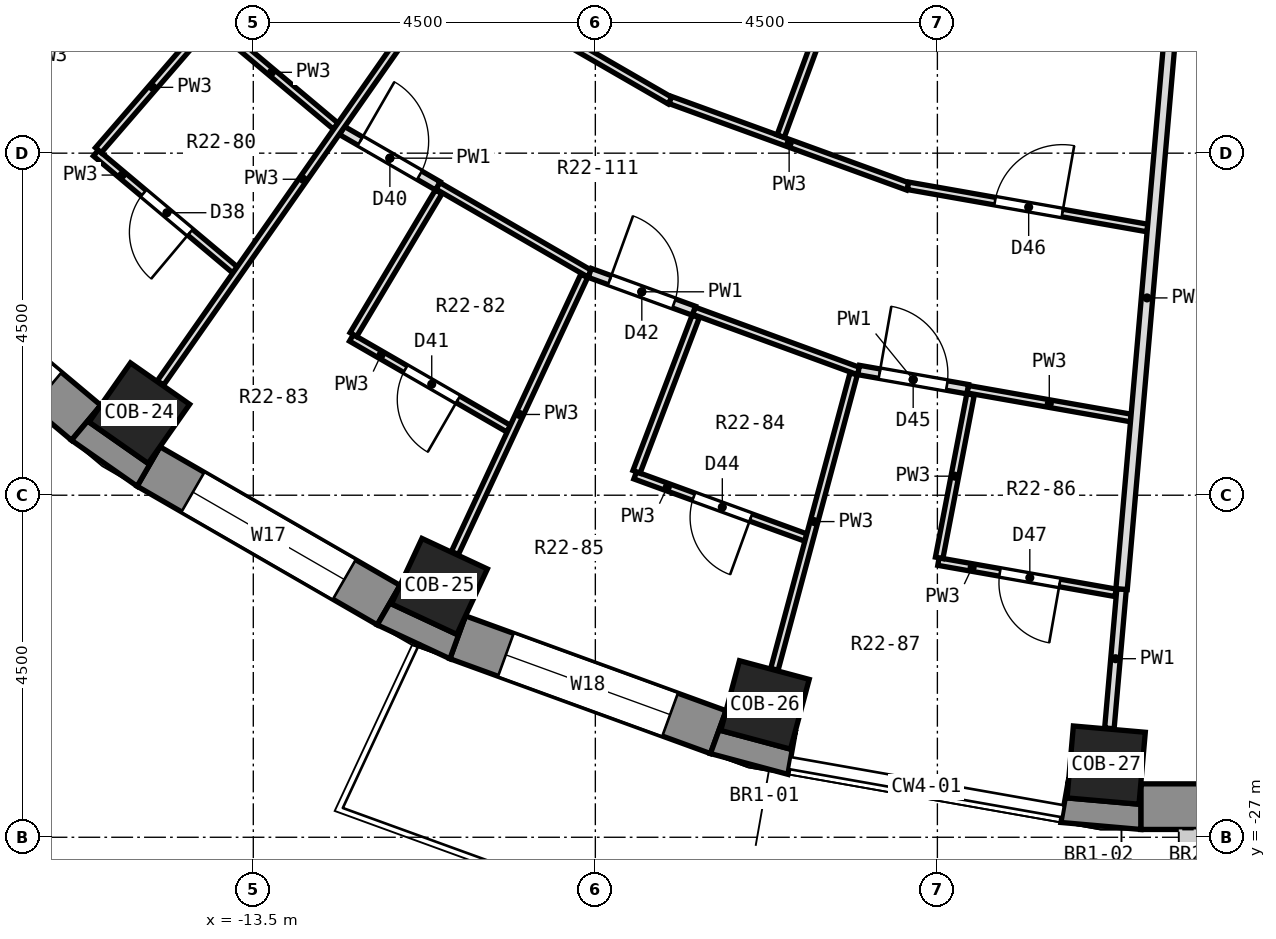
"""IFC4 building model, lengths in metres.
Left out: names, types, materials, properties, quantities, classifications, styles, units other than length and angle.
Written with IfcOpenShell. Run it as: python <this file> out.ifc"""

import sys

from ifc_helpers import new_model, si_unit, direction, frame, frame_2d, origin, origin_2d, place, context, subcontext, project, spatial, polyline, rectangle, outline, extrude, element, fill, save


model = new_model("IFC4")
c1 = context("Model", 3, precision=1e-05, world=origin(), true_north=direction((0.0, 1.0)))
c2 = subcontext(c1, "Body", "Model", "MODEL_VIEW")
j1 = project(units=[si_unit("LENGTHUNIT", "METRE"), si_unit("PLANEANGLEUNIT", "RADIAN")], contexts=[c1])
p1 = place(None, origin())
s1 = spatial("IfcSite", under=j1, at=p1, CompositionType="ELEMENT")
p2 = place(p1, origin())
s2 = spatial("IfcBuilding", under=s1, at=p2, CompositionType="ELEMENT")
p3 = place(p2, frame((0.0, 0.0, 141.4)))
s3 = spatial("IfcBuildingStorey", under=s2, at=p3, CompositionType="ELEMENT", Elevation=141.4)
for number, where, z_axis, x_axis in (
    (1, (-14.999, -21.421, 0.0), (0.0, 0.0, 1.0), (-0.574, -0.819, 0.0)),
    (2, (-11.052, -23.7, 0.0), (0.0, 0.0, 1.0), (-0.423, -0.906, 0.0)),
    (3, (-6.768, -25.259, 0.0), (0.0, 0.0, 1.0), (-0.259, -0.966, 0.0)),
    (4, (-2.279, -26.051, 0.0), (0.0, 0.0, 1.0), (-0.087, -0.996, 0.0)),
):
    element("IfcColumn", number, at=place(p3, frame(where, z_axis=z_axis, x_axis=x_axis)), inside=s3, PredefinedType="COLUMN", context=c2, shape_type="SweptSolid", body=[
        extrude(rectangle(XDim=0.95, YDim=0.95, at=origin_2d()), origin(), (0.0, 0.0, 1.0), 3.3),
    ])
p4 = place(p3, frame((-18.494, -19.202, 0.0), z_axis=(0.0, 0.0, 1.0), x_axis=(0.766055462616, -0.642774476932, 0.0)))
e5 = element("IfcWall", 5, at=p4, inside=s3, PredefinedType="SOLIDWALL", context=c2, shape_type="SweptSolid", body=[
    extrude(rectangle(XDim=3.648, YDim=0.6, at=frame_2d((1.824, 0.0))), origin(), (0.0, 0.0, 1.0), 2.8),
])
p5 = place(p4, frame((0.674, 0.0, 0.9)))
e6 = element("IfcOpeningElement", 6, at=p5, cuts=e5, PredefinedType="OPENING", context=c2, shape_type="SweptSolid", body=[
    extrude(rectangle(XDim=2.3, YDim=1.8, at=frame_2d((1.15, 0.9))), frame((0.0, 0.312, 0.0), z_axis=(0.0, -1.0, 0.0), x_axis=(1.0, 0.0, 0.0)), (0.0, 0.0, 1.0), 0.624),
])
p6 = place(p3, frame((-14.878, -22.122, 0.0), z_axis=(0.0, 0.0, 1.0), x_axis=(0.866051847062, -0.499954196102, 0.0)))
e7 = element("IfcWall", 7, at=p6, inside=s3, PredefinedType="SOLIDWALL", context=c2, shape_type="SweptSolid", body=[
    extrude(rectangle(XDim=3.648, YDim=0.6, at=frame_2d((1.824, 0.0))), origin(), (0.0, 0.0, 1.0), 2.8),
])
p7 = place(p6, frame((0.674, 0.0, 0.9)))
e8 = element("IfcOpeningElement", 8, at=p7, cuts=e7, PredefinedType="OPENING", context=c2, shape_type="SweptSolid", body=[
    extrude(rectangle(XDim=2.3, YDim=1.8, at=frame_2d((1.15, 0.9))), frame((0.0, 0.312, 0.0), z_axis=(0.0, -1.0, 0.0), x_axis=(1.0, 0.0, 0.0)), (0.0, 0.0, 1.0), 0.624),
])
p8 = place(p3, frame((-10.811, -24.369, 0.0), z_axis=(0.0, 0.0, 1.0), x_axis=(0.939703505393, -0.341990236633, 0.0)))
e9 = element("IfcWall", 9, at=p8, inside=s3, PredefinedType="SOLIDWALL", context=c2, shape_type="SweptSolid", body=[
    extrude(rectangle(XDim=3.648, YDim=0.6, at=frame_2d((1.824, 0.0))), origin(), (0.0, 0.0, 1.0), 2.8),
])
p9 = place(p8, frame((0.674, 0.0, 0.9)))
e10 = element("IfcOpeningElement", 10, at=p9, cuts=e9, PredefinedType="OPENING", context=c2, shape_type="SweptSolid", body=[
    extrude(rectangle(XDim=2.3, YDim=1.8, at=frame_2d((1.15, 0.9))), frame((0.0, 0.312, 0.0), z_axis=(0.0, -1.0, 0.0), x_axis=(1.0, 0.0, 0.0)), (0.0, 0.0, 1.0), 0.624),
])
p10 = place(p3, frame((-1.824, -26.597, 0.0), z_axis=(0.0, 0.0, 1.0), x_axis=(1.0, 0.0, 0.0)))
e11 = element("IfcWall", 11, at=p10, inside=s3, PredefinedType="SOLIDWALL", context=c2, shape_type="SweptSolid", body=[
    extrude(rectangle(XDim=3.648, YDim=0.6, at=frame_2d((1.824, 0.0))), origin(), (0.0, 0.0, 1.0), 2.8),
])
p11 = place(p10, frame((0.974, 0.0, 0.0)))
e12 = element("IfcOpeningElement", 12, at=p11, cuts=e11, PredefinedType="OPENING", context=c2, shape_type="SweptSolid", body=[
    extrude(rectangle(XDim=1.7, YDim=2.4, at=frame_2d((0.85, 1.2))), frame((0.0, 0.312, 0.0), z_axis=(0.0, -1.0, 0.0), x_axis=(1.0, 0.0, 0.0)), (0.0, 0.0, 1.0), 0.624),
])
p12 = place(p3, origin())
e13 = element("IfcWall", 13, at=p12, inside=s3, PredefinedType="SOLIDWALL", context=c2, shape_type="SweptSolid", body=[
    extrude(outline(polyline([(-15.028, -22.382), (-14.728, -21.862), (-14.882, -22.083), (-15.661, -21.538), (-15.506, -21.317), (-15.892, -21.777), (-15.028, -22.382)])), origin(), (0.0, 0.0, 1.0), 2.8),
])
p13 = place(p3, origin())
e14 = element("IfcWall", 14, at=p13, inside=s3, PredefinedType="SOLIDWALL", context=c2, shape_type="SweptSolid", body=[
    extrude(outline(polyline([(-10.913, -24.651), (-10.708, -24.087), (-10.822, -24.331), (-11.683, -23.93), (-11.569, -23.686), (-11.869, -24.206), (-10.913, -24.651)])), origin(), (0.0, 0.0, 1.0), 2.8),
])
p14 = place(p3, origin())
e15 = element("IfcWall", 15, at=p14, inside=s3, PredefinedType="SOLIDWALL", context=c2, shape_type="SweptSolid", body=[
    extrude(outline(polyline([(-7.486, -25.899), (-6.467, -26.172), (-6.363, -25.581), (-6.432, -25.841), (-7.35, -25.595), (-7.28, -25.335), (-7.486, -25.899)])), origin(), (0.0, 0.0, 1.0), 2.8),
])
p15 = place(p3, origin())
e16 = element("IfcWall", 16, at=p15, inside=s3, PredefinedType="SOLIDWALL", context=c2, shape_type="SweptSolid", body=[
    extrude(outline(polyline([(-2.875, -26.805), (-1.824, -26.897), (-1.824, -26.297), (-1.847, -26.565), (-2.794, -26.482), (-2.77, -26.215), (-2.875, -26.805)])), origin(), (0.0, 0.0, 1.0), 2.8),
])
p16 = place(p3, frame((-15.571, -17.999, 0.0), z_axis=(0.0, 0.0, 1.0), x_axis=(0.765914077477, -0.642942941421, 0.0)))
e17 = element("IfcWall", 17, at=p16, inside=s3, PredefinedType="PARTITIONING", context=c2, shape_type="SweptSolid", body=[
    extrude(rectangle(XDim=2.39, YDim=0.1, at=frame_2d((1.195, 0.0))), origin(), (0.0, 0.0, 1.0), 2.8),
])
p17 = place(p16, frame((0.82, 0.0, 0.0)))
e18 = element("IfcOpeningElement", 18, at=p17, cuts=e17, PredefinedType="OPENING", context=c2, shape_type="SweptSolid", body=[
    extrude(rectangle(XDim=0.8, YDim=2.1, at=frame_2d((0.4, 1.05))), frame((0.0, 0.062, 0.0), z_axis=(0.0, -1.0, 0.0), x_axis=(1.0, 0.0, 0.0)), (0.0, 0.0, 1.0), 0.124),
])
p18 = place(p3, frame((-14.104, -16.228, 0.0), z_axis=(0.0, 0.0, 1.0), x_axis=(0.766093039246, -0.642729690631, 0.0)))
e19 = element("IfcWall", 19, at=p18, inside=s3, PredefinedType="PARTITIONING", context=c2, shape_type="SweptSolid", body=[
    extrude(rectangle(XDim=2.205, YDim=0.1, at=frame_2d((1.102, 0.0))), origin(), (0.0, 0.0, 1.0), 2.8),
])
p19 = place(p3, frame((-11.072, -18.43, 0.0), z_axis=(0.0, 0.0, 1.0), x_axis=(0.865486689549, -0.500931921735, 0.0)))
e20 = element("IfcWall", 20, at=p19, inside=s3, PredefinedType="PARTITIONING", context=c2, shape_type="SweptSolid", body=[
    extrude(rectangle(XDim=2.306, YDim=0.1, at=frame_2d((1.153, 0.0))), origin(), (0.0, 0.0, 1.0), 2.8),
])
p20 = place(p3, frame((-12.209, -20.43, 0.0), z_axis=(0.0, 0.0, 1.0), x_axis=(0.865989934965, -0.500061428766, 0.0)))
e21 = element("IfcWall", 21, at=p20, inside=s3, PredefinedType="PARTITIONING", context=c2, shape_type="SweptSolid", body=[
    extrude(rectangle(XDim=2.39, YDim=0.1, at=frame_2d((1.195, 0.0))), origin(), (0.0, 0.0, 1.0), 2.8),
])
p21 = place(p20, frame((0.82, 0.0, 0.0)))
e22 = element("IfcOpeningElement", 22, at=p21, cuts=e21, PredefinedType="OPENING", context=c2, shape_type="SweptSolid", body=[
    extrude(rectangle(XDim=0.8, YDim=2.1, at=frame_2d((0.4, 1.05))), frame((0.0, 0.062, 0.0), z_axis=(0.0, -1.0, 0.0), x_axis=(1.0, 0.0, 0.0)), (0.0, 0.0, 1.0), 0.124),
])
p22 = place(p3, frame((-12.334, -17.702, 0.0), z_axis=(0.0, 0.0, 1.0), x_axis=(0.866110229381, -0.499853048967, 0.0)))
e23 = element("IfcWall", 23, at=p22, inside=s3, PredefinedType="PARTITIONING", context=c2, shape_type="SweptSolid", body=[
    extrude(rectangle(XDim=1.457, YDim=0.125, at=frame_2d((0.728, 0.0))), origin(), (0.0, 0.0, 1.0), 2.8),
])
p23 = place(p22, frame((0.278, 0.0, 0.0)))
e24 = element("IfcOpeningElement", 24, at=p23, cuts=e23, PredefinedType="OPENING", context=c2, shape_type="SweptSolid", body=[
    extrude(rectangle(XDim=0.9, YDim=2.1, at=frame_2d((0.45, 1.05))), frame((0.0, 0.074, 0.0), z_axis=(0.0, -1.0, 0.0), x_axis=(1.0, 0.0, 0.0)), (0.0, 0.0, 1.0), 0.149),
])
p24 = place(p3, frame((-10.896, -15.647, 0.0), z_axis=(0.0, 0.0, 1.0), x_axis=(0.866052313871, -0.499953387465, 0.0)))
e25 = element("IfcWall", 25, at=p24, inside=s3, PredefinedType="PARTITIONING", context=c2, shape_type="SweptSolid", body=[
    extrude(rectangle(XDim=3.325, YDim=0.1, at=frame_2d((1.663, 0.0))), origin(), (0.0, 0.0, 1.0), 2.8),
])
p25 = place(p3, frame((-7.704, -20.073, 0.0), z_axis=(0.0, 0.0, 1.0), x_axis=(0.939002837997, -0.343909392476, 0.0)))
e26 = element("IfcWall", 26, at=p25, inside=s3, PredefinedType="PARTITIONING", context=c2, shape_type="SweptSolid", body=[
    extrude(rectangle(XDim=2.306, YDim=0.1, at=frame_2d((1.153, 0.0))), origin(), (0.0, 0.0, 1.0), 2.8),
])
p26 = place(p3, frame((-8.476, -22.239, 0.0), z_axis=(0.0, 0.0, 1.0), x_axis=(0.939644231496, -0.342153062556, 0.0)))
e27 = element("IfcWall", 27, at=p26, inside=s3, PredefinedType="PARTITIONING", context=c2, shape_type="SweptSolid", body=[
    extrude(rectangle(XDim=2.39, YDim=0.1, at=frame_2d((1.195, 0.0))), origin(), (0.0, 0.0, 1.0), 2.8),
])
p27 = place(p26, frame((0.82, 0.0, 0.0)))
e28 = element("IfcOpeningElement", 28, at=p27, cuts=e27, PredefinedType="OPENING", context=c2, shape_type="SweptSolid", body=[
    extrude(rectangle(XDim=0.8, YDim=2.1, at=frame_2d((0.4, 1.05))), frame((0.0, 0.062, 0.0), z_axis=(0.0, -1.0, 0.0), x_axis=(1.0, 0.0, 0.0)), (0.0, 0.0, 1.0), 0.124),
])
p28 = place(p3, frame((-9.073, -19.575, 0.0), z_axis=(0.0, 0.0, 1.0), x_axis=(0.939788529673, -0.341756520778, 0.0)))
e29 = element("IfcWall", 29, at=p28, inside=s3, PredefinedType="PARTITIONING", context=c2, shape_type="SweptSolid", body=[
    extrude(rectangle(XDim=1.457, YDim=0.125, at=frame_2d((0.728, 0.0))), origin(), (0.0, 0.0, 1.0), 2.8),
])
p29 = place(p28, frame((0.278, 0.0, 0.0)))
e30 = element("IfcOpeningElement", 30, at=p29, cuts=e29, PredefinedType="OPENING", context=c2, shape_type="SweptSolid", body=[
    extrude(rectangle(XDim=0.9, YDim=2.1, at=frame_2d((0.45, 1.05))), frame((0.0, 0.074, 0.0), z_axis=(0.0, -1.0, 0.0), x_axis=(1.0, 0.0, 0.0)), (0.0, 0.0, 1.0), 0.149),
])
p30 = place(p3, frame((-8.013, -17.301, 0.0), z_axis=(0.0, 0.0, 1.0), x_axis=(0.939703357515, -0.341990642965, 0.0)))
e31 = element("IfcWall", 31, at=p30, inside=s3, PredefinedType="PARTITIONING", context=c2, shape_type="SweptSolid", body=[
    extrude(rectangle(XDim=3.325, YDim=0.1, at=frame_2d((1.663, 0.0))), origin(), (0.0, 0.0, 1.0), 2.8),
])
p31 = place(p3, frame((-4.486, -23.373, 0.0), z_axis=(0.0, 0.0, 1.0), x_axis=(0.984805365509, -0.173661717325, 0.0)))
e32 = element("IfcWall", 32, at=p31, inside=s3, PredefinedType="PARTITIONING", context=c2, shape_type="SweptSolid", body=[
    extrude(rectangle(XDim=2.366, YDim=0.1, at=frame_2d((1.183, 0.0))), origin(), (0.0, 0.0, 1.0), 2.8),
])
p32 = place(p31, frame((0.821, 0.0, 0.0)))
e33 = element("IfcOpeningElement", 33, at=p32, cuts=e32, PredefinedType="OPENING", context=c2, shape_type="SweptSolid", body=[
    extrude(rectangle(XDim=0.8, YDim=2.1, at=frame_2d((0.4, 1.05))), frame((0.0, 0.062, 0.0), z_axis=(0.0, -1.0, 0.0), x_axis=(1.0, 0.0, 0.0)), (0.0, 0.0, 1.0), 0.124),
])
p33 = place(p3, frame((-4.101, -21.105, 0.0), z_axis=(0.0, 0.0, 1.0), x_axis=(0.984793705714, -0.173727825019, 0.0)))
e34 = element("IfcWall", 34, at=p33, inside=s3, PredefinedType="PARTITIONING", context=c2, shape_type="SweptSolid", body=[
    extrude(rectangle(XDim=2.18, YDim=0.1, at=frame_2d((1.09, 0.0))), origin(), (0.0, 0.0, 1.0), 2.8),
])
p34 = place(p3, frame((-5.536, -20.853, 0.0), z_axis=(0.0, 0.0, 1.0), x_axis=(0.984862774054, -0.173335848233, 0.0)))
e35 = element("IfcWall", 35, at=p34, inside=s3, PredefinedType="PARTITIONING", context=c2, shape_type="SweptSolid", body=[
    extrude(rectangle(XDim=1.456, YDim=0.125, at=frame_2d((0.728, 0.0))), origin(), (0.0, 0.0, 1.0), 2.8),
])
p35 = place(p34, frame((0.278, 0.0, 0.0)))
e36 = element("IfcOpeningElement", 36, at=p35, cuts=e35, PredefinedType="OPENING", context=c2, shape_type="SweptSolid", body=[
    extrude(rectangle(XDim=0.9, YDim=2.1, at=frame_2d((0.45, 1.05))), frame((0.0, 0.074, 0.0), z_axis=(0.0, -1.0, 0.0), x_axis=(1.0, 0.0, 0.0)), (0.0, 0.0, 1.0), 0.149),
])
p36 = place(p3, frame((-4.887, -18.43, 0.0), z_axis=(0.0, 0.0, 1.0), x_axis=(0.984827318257, -0.173537181071, 0.0)))
e37 = element("IfcWall", 37, at=p36, inside=s3, PredefinedType="PARTITIONING", context=c2, shape_type="SweptSolid", body=[
    extrude(rectangle(XDim=3.199, YDim=0.1, at=frame_2d((1.6, 0.0))), origin(), (0.0, 0.0, 1.0), 2.8),
])
p37 = place(p36, frame((1.162, 0.0, 0.0)))
e38 = element("IfcOpeningElement", 38, at=p37, cuts=e37, PredefinedType="OPENING", context=c2, shape_type="SweptSolid", body=[
    extrude(rectangle(XDim=0.9, YDim=2.1, at=frame_2d((0.45, 1.05))), frame((0.0, 0.062, 0.0), z_axis=(0.0, -1.0, 0.0), x_axis=(1.0, 0.0, 0.0)), (0.0, 0.0, 1.0), 0.124),
])
p38 = place(p3, frame((-18.148, -18.148, 0.0), z_axis=(0.0, 0.0, 1.0), x_axis=(0.707106781187, 0.707106781187, 0.0)))
e39 = element("IfcWall", 39, at=p38, inside=s3, PredefinedType="PARTITIONING", context=c2, shape_type="SweptSolid", body=[
    extrude(rectangle(XDim=4.023, YDim=0.1, at=frame_2d((2.011, 0.0))), origin(), (0.0, 0.0, 1.0), 2.8),
])
p39 = place(p3, frame((-15.538, -17.961, 0.0), z_axis=(0.0, 0.0, 1.0), x_axis=(0.654433202149, 0.756119821143, 0.0)))
e40 = element("IfcWall", 40, at=p39, inside=s3, PredefinedType="PARTITIONING", context=c2, shape_type="SweptSolid", body=[
    extrude(rectangle(XDim=2.187, YDim=0.1, at=frame_2d((1.094, 0.0))), origin(), (0.0, 0.0, 1.0), 2.8),
])
p40 = place(p3, frame((-14.721, -21.023, 0.0), z_axis=(0.0, 0.0, 1.0), x_axis=(0.573845384598, 0.818963658886, 0.0)))
e41 = element("IfcWall", 41, at=p40, inside=s3, PredefinedType="PARTITIONING", context=c2, shape_type="SweptSolid", body=[
    extrude(rectangle(XDim=6.544, YDim=0.1, at=frame_2d((3.272, 0.0))), origin(), (0.0, 0.0, 1.0), 2.8),
])
p41 = place(p3, frame((-12.183, -20.387, 0.0), z_axis=(0.0, 0.0, 1.0), x_axis=(0.512903306279, 0.85844638645, 0.0)))
e42 = element("IfcWall", 42, at=p41, inside=s3, PredefinedType="PARTITIONING", context=c2, shape_type="SweptSolid", body=[
    extrude(rectangle(XDim=2.188, YDim=0.1, at=frame_2d((1.094, 0.0))), origin(), (0.0, 0.0, 1.0), 2.8),
])
p42 = place(p3, frame((-10.848, -23.26, 0.0), z_axis=(0.0, 0.0, 1.0), x_axis=(0.422895432818, 0.906178488434, 0.0)))
e43 = element("IfcWall", 43, at=p42, inside=s3, PredefinedType="PARTITIONING", context=c2, shape_type="SweptSolid", body=[
    extrude(rectangle(XDim=4.023, YDim=0.1, at=frame_2d((2.011, 0.0))), origin(), (0.0, 0.0, 1.0), 2.8),
])
p43 = place(p3, frame((-8.458, -22.192, 0.0), z_axis=(0.0, 0.0, 1.0), x_axis=(0.35615776917, 0.934425836255, 0.0)))
e44 = element("IfcWall", 44, at=p43, inside=s3, PredefinedType="PARTITIONING", context=c2, shape_type="SweptSolid", body=[
    extrude(rectangle(XDim=2.188, YDim=0.1, at=frame_2d((1.094, 0.0))), origin(), (0.0, 0.0, 1.0), 2.8),
])
p44 = place(p3, frame((-6.562, -17.776, 0.0), z_axis=(0.0, 0.0, 1.0), x_axis=(0.346197589544, 0.938161622, 0.0)))
e45 = element("IfcWall", 45, at=p44, inside=s3, PredefinedType="PARTITIONING", context=c2, shape_type="SweptSolid", body=[
    extrude(rectangle(XDim=7.285, YDim=0.1, at=frame_2d((3.643, 0.0))), origin(), (0.0, 0.0, 1.0), 2.8),
])
p45 = place(p44, frame((3.2, 0.0, 0.0)))
e46 = element("IfcOpeningElement", 46, at=p45, cuts=e45, PredefinedType="OPENING", context=c2, shape_type="SweptSolid", body=[
    extrude(rectangle(XDim=0.9, YDim=2.1, at=frame_2d((0.45, 1.05))), frame((0.0, 0.062, 0.0), z_axis=(0.0, -1.0, 0.0), x_axis=(1.0, 0.0, 0.0)), (0.0, 0.0, 1.0), 0.124),
])
p46 = place(p3, frame((-6.644, -24.79, 0.0), z_axis=(0.0, 0.0, 1.0), x_axis=(0.259176889868, 0.965829871022, 0.0)))
e47 = element("IfcWall", 47, at=p46, inside=s3, PredefinedType="PARTITIONING", context=c2, shape_type="SweptSolid", body=[
    extrude(rectangle(XDim=4.023, YDim=0.1, at=frame_2d((2.012, 0.0))), origin(), (0.0, 0.0, 1.0), 2.8),
])
p47 = place(p3, frame((-4.477, -23.324, 0.0), z_axis=(0.0, 0.0, 1.0), x_axis=(0.188685986474, 0.982037473067, 0.0)))
e48 = element("IfcWall", 48, at=p47, inside=s3, PredefinedType="PARTITIONING", context=c2, shape_type="SweptSolid", body=[
    extrude(rectangle(XDim=2.188, YDim=0.1, at=frame_2d((1.094, 0.0))), origin(), (0.0, 0.0, 1.0), 2.8),
])
p48 = place(p3, frame((-2.237, -25.567, 0.0), z_axis=(0.0, 0.0, 1.0), x_axis=(0.087185058121, 0.996192132894, 0.0)))
e49 = element("IfcWall", 49, at=p48, inside=s3, PredefinedType="PARTITIONING", context=c2, shape_type="SweptSolid", body=[
    extrude(rectangle(XDim=1.84, YDim=0.125, at=frame_2d((0.92, 0.0))), origin(), (0.0, 0.0, 1.0), 2.8),
])
p49 = place(p3, frame((-2.077, -23.735, 0.0), z_axis=(0.0, 0.0, 1.0), x_axis=(0.087062572149, 0.996202845073, 0.0)))
e50 = element("IfcWall", 50, at=p49, inside=s3, PredefinedType="PARTITIONING", context=c2, shape_type="SweptSolid", body=[
    extrude(rectangle(XDim=7.689, YDim=0.15, at=frame_2d((3.845, 0.0))), origin(), (0.0, 0.0, 1.0), 2.8),
])
p50 = place(p5, origin())
e51 = element("IfcWindow", 51, at=p50, inside=s3, PartitioningType="SINGLE_PANEL", PredefinedType="WINDOW", context=c2, shape_type="SweptSolid", body=[
    extrude(rectangle(XDim=2.3, YDim=1.8, at=frame_2d((1.15, 0.9))), frame((0.0, 0.18, 0.0), z_axis=(0.0, -1.0, 0.0), x_axis=(1.0, 0.0, 0.0)), (0.0, 0.0, 1.0), 0.06),
])
fill(e6, e51)
p51 = place(p7, origin())
e52 = element("IfcWindow", 52, at=p51, inside=s3, PartitioningType="SINGLE_PANEL", PredefinedType="WINDOW", context=c2, shape_type="SweptSolid", body=[
    extrude(rectangle(XDim=2.3, YDim=1.8, at=frame_2d((1.15, 0.9))), frame((0.0, 0.18, 0.0), z_axis=(0.0, -1.0, 0.0), x_axis=(1.0, 0.0, 0.0)), (0.0, 0.0, 1.0), 0.06),
])
fill(e8, e52)
p52 = place(p9, origin())
e53 = element("IfcWindow", 53, at=p52, inside=s3, PartitioningType="SINGLE_PANEL", PredefinedType="WINDOW", context=c2, shape_type="SweptSolid", body=[
    extrude(rectangle(XDim=2.3, YDim=1.8, at=frame_2d((1.15, 0.9))), frame((0.0, 0.18, 0.0), z_axis=(0.0, -1.0, 0.0), x_axis=(1.0, 0.0, 0.0)), (0.0, 0.0, 1.0), 0.06),
])
fill(e10, e53)
p53 = place(p17, frame((0.8, 0.0, 0.0), z_axis=(0.0, 0.0, 1.0), x_axis=(-1.0, 0.0, 0.0)))
e54 = element("IfcDoor", 54, at=p53, inside=s3, OperationType="SINGLE_SWING_LEFT", PredefinedType="DOOR", context=c2, shape_type="SweptSolid", body=[
    extrude(rectangle(XDim=0.8, YDim=2.1, at=frame_2d((0.4, 1.05))), frame((0.0, 0.025, 0.0), z_axis=(0.0, -1.0, 0.0), x_axis=(1.0, 0.0, 0.0)), (0.0, 0.0, 1.0), 0.05),
])
fill(e18, e54)
p54 = place(p23, origin())
e55 = element("IfcDoor", 55, at=p54, inside=s3, OperationType="SINGLE_SWING_LEFT", PredefinedType="DOOR", context=c2, shape_type="SweptSolid", body=[
    extrude(rectangle(XDim=0.9, YDim=2.1, at=frame_2d((0.45, 1.05))), frame((0.0, 0.025, 0.0), z_axis=(0.0, -1.0, 0.0), x_axis=(1.0, 0.0, 0.0)), (0.0, 0.0, 1.0), 0.05),
])
fill(e24, e55)
p55 = place(p21, frame((0.8, 0.0, 0.0), z_axis=(0.0, 0.0, 1.0), x_axis=(-1.0, 0.0, 0.0)))
e56 = element("IfcDoor", 56, at=p55, inside=s3, OperationType="SINGLE_SWING_LEFT", PredefinedType="DOOR", context=c2, shape_type="SweptSolid", body=[
    extrude(rectangle(XDim=0.8, YDim=2.1, at=frame_2d((0.4, 1.05))), frame((0.0, 0.025, 0.0), z_axis=(0.0, -1.0, 0.0), x_axis=(1.0, 0.0, 0.0)), (0.0, 0.0, 1.0), 0.05),
])
fill(e22, e56)
p56 = place(p29, origin())
e57 = element("IfcDoor", 57, at=p56, inside=s3, OperationType="SINGLE_SWING_LEFT", PredefinedType="DOOR", context=c2, shape_type="SweptSolid", body=[
    extrude(rectangle(XDim=0.9, YDim=2.1, at=frame_2d((0.45, 1.05))), frame((0.0, 0.025, 0.0), z_axis=(0.0, -1.0, 0.0), x_axis=(1.0, 0.0, 0.0)), (0.0, 0.0, 1.0), 0.05),
])
fill(e30, e57)
p57 = place(p27, frame((0.8, 0.0, 0.0), z_axis=(0.0, 0.0, 1.0), x_axis=(-1.0, 0.0, 0.0)))
e58 = element("IfcDoor", 58, at=p57, inside=s3, OperationType="SINGLE_SWING_LEFT", PredefinedType="DOOR", context=c2, shape_type="SweptSolid", body=[
    extrude(rectangle(XDim=0.8, YDim=2.1, at=frame_2d((0.4, 1.05))), frame((0.0, 0.025, 0.0), z_axis=(0.0, -1.0, 0.0), x_axis=(1.0, 0.0, 0.0)), (0.0, 0.0, 1.0), 0.05),
])
fill(e28, e58)
p58 = place(p35, origin())
e59 = element("IfcDoor", 59, at=p58, inside=s3, OperationType="SINGLE_SWING_LEFT", PredefinedType="DOOR", context=c2, shape_type="SweptSolid", body=[
    extrude(rectangle(XDim=0.9, YDim=2.1, at=frame_2d((0.45, 1.05))), frame((0.0, 0.025, 0.0), z_axis=(0.0, -1.0, 0.0), x_axis=(1.0, 0.0, 0.0)), (0.0, 0.0, 1.0), 0.05),
])
fill(e36, e59)
p59 = place(p37, origin())
e60 = element("IfcDoor", 60, at=p59, inside=s3, OperationType="SINGLE_SWING_RIGHT", PredefinedType="DOOR", context=c2, shape_type="SweptSolid", body=[
    extrude(rectangle(XDim=0.9, YDim=2.1, at=frame_2d((0.45, 1.05))), frame((0.0, 0.025, 0.0), z_axis=(0.0, -1.0, 0.0), x_axis=(1.0, 0.0, 0.0)), (0.0, 0.0, 1.0), 0.05),
])
fill(e38, e60)
p60 = place(p32, frame((0.8, 0.0, 0.0), z_axis=(0.0, 0.0, 1.0), x_axis=(-1.0, 0.0, 0.0)))
e61 = element("IfcDoor", 61, at=p60, inside=s3, OperationType="SINGLE_SWING_LEFT", PredefinedType="DOOR", context=c2, shape_type="SweptSolid", body=[
    extrude(rectangle(XDim=0.8, YDim=2.1, at=frame_2d((0.4, 1.05))), frame((0.0, 0.025, 0.0), z_axis=(0.0, -1.0, 0.0), x_axis=(1.0, 0.0, 0.0)), (0.0, 0.0, 1.0), 0.05),
])
fill(e33, e61)
save(model, sys.argv[1])
